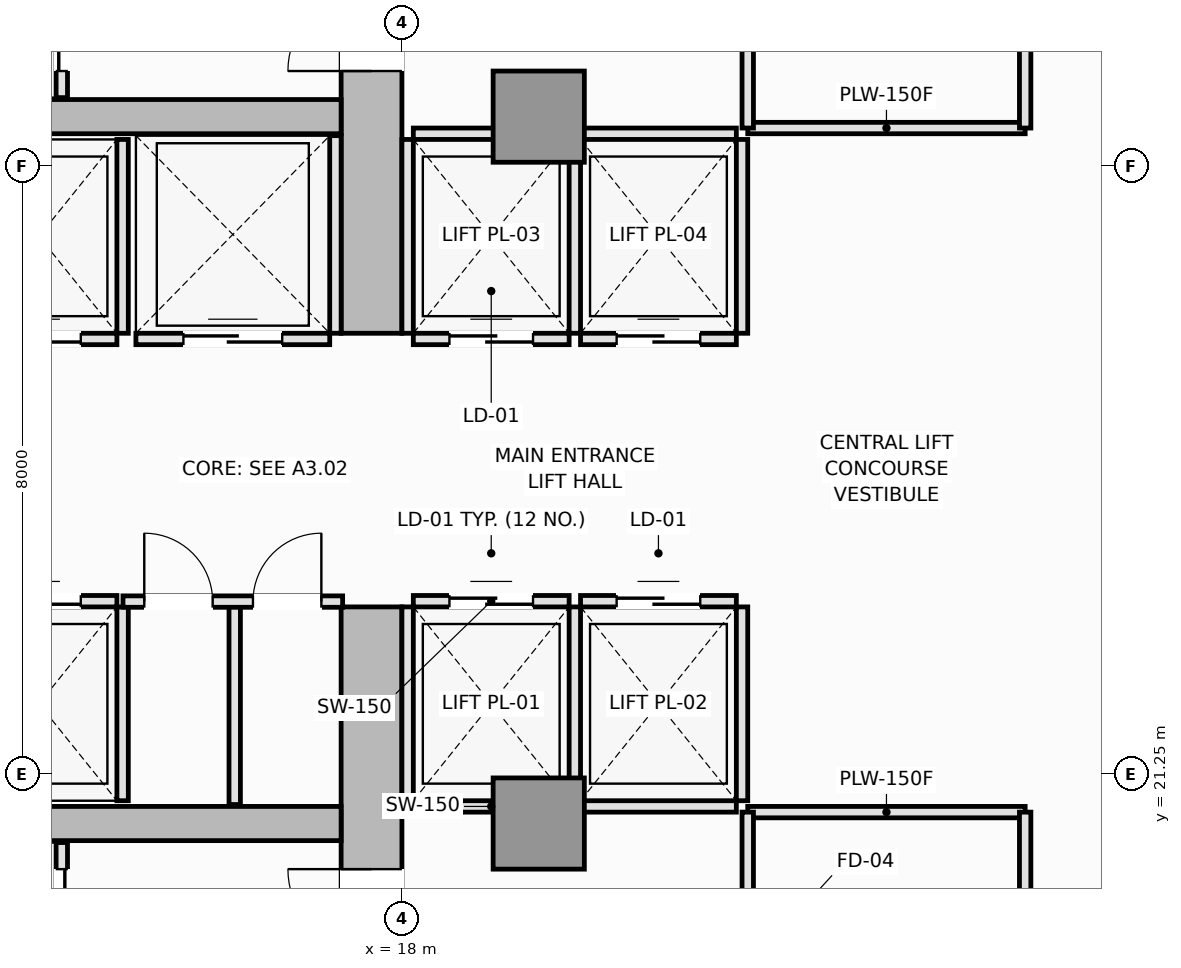
"""IFC4 building model, lengths in metres.
Left out: names, types, materials, properties, quantities, classifications, styles, units other than length and angle.
Written with IfcOpenShell. Run it as: python <this file> out.ifc"""

import sys

from ifc_helpers import new_model, si_unit, direction, frame, frame_2d, origin, origin_2d, place, context, subcontext, project, spatial, rectangle, extrude, element, fill, save


model = new_model("IFC4")
c1 = context("Model", 3, precision=1e-05, world=origin(), true_north=direction((0.0, 1.0)))
c2 = subcontext(c1, "Body", "Model", "MODEL_VIEW")
j1 = project(units=[si_unit("LENGTHUNIT", "METRE"), si_unit("PLANEANGLEUNIT", "RADIAN")], contexts=[c1])
p1 = place(None, origin())
s1 = spatial("IfcSite", under=j1, at=p1, CompositionType="ELEMENT")
p2 = place(p1, origin())
s2 = spatial("IfcBuilding", under=s1, at=p2, CompositionType="ELEMENT")
p3 = place(p2, origin())
s3 = spatial("IfcBuildingStorey", under=s2, at=p3, CompositionType="ELEMENT", Elevation=0.0)
p4 = place(p3, frame((17.6, 14.8, 0.0), z_axis=(0.0, 0.0, 1.0), x_axis=(0.0, 1.0, 0.0)))
e1 = element("IfcWall", 1, at=p4, inside=s3, PredefinedType="SHEAR", context=c2, shape_type="SweptSolid", body=[
    extrude(rectangle(XDim=8.65, YDim=0.8, at=frame_2d((4.325, 0.0))), origin(), (0.0, 0.0, 1.0), 6.0),
])
p5 = place(p4, frame((4.1, 0.0, 0.0)))
e2 = element("IfcOpeningElement", 2, at=p5, cuts=e1, PredefinedType="OPENING", context=c2, shape_type="SweptSolid", body=[
    extrude(rectangle(XDim=1.1, YDim=2.15, at=frame_2d((0.55, 1.075))), frame((0.0, 0.41, 0.0), z_axis=(0.0, -1.0, 0.0), x_axis=(1.0, 0.0, 0.0)), (0.0, 0.0, 1.0), 0.82),
])
p6 = place(p3, frame((17.6, 27.05, 0.0), z_axis=(0.0, 0.0, 1.0), x_axis=(0.0, 1.0, 0.0)))
e3 = element("IfcWall", 3, at=p6, inside=s3, PredefinedType="SHEAR", context=c2, shape_type="SweptSolid", body=[
    extrude(rectangle(XDim=8.65, YDim=0.8, at=frame_2d((4.325, 0.0))), origin(), (0.0, 0.0, 1.0), 6.0),
])
p7 = place(p6, frame((3.45, 0.0, 0.0)))
e4 = element("IfcOpeningElement", 4, at=p7, cuts=e3, PredefinedType="OPENING", context=c2, shape_type="SweptSolid", body=[
    extrude(rectangle(XDim=1.1, YDim=2.15, at=frame_2d((0.55, 1.075))), frame((0.0, 0.41, 0.0), z_axis=(0.0, -1.0, 0.0), x_axis=(1.0, 0.0, 0.0)), (0.0, 0.0, 1.0), 0.82),
])
for number, where, z_axis, x_axis in (
    (5, (5.3, 20.6, 0.0), (0.0, 0.0, 1.0), (1.0, 0.0, 0.0)),
    (6, (5.3, 29.9, 0.0), (0.0, 0.0, 1.0), (1.0, 0.0, 0.0)),
):
    element("IfcWall", number, at=place(p3, frame(where, z_axis=z_axis, x_axis=x_axis)), inside=s3, PredefinedType="SHEAR", context=c2, shape_type="SweptSolid", body=[
        extrude(rectangle(XDim=11.9, YDim=0.45, at=frame_2d((5.95, 0.0))), origin(), (0.0, 0.0, 1.0), 6.0),
    ])
for number, where, z_axis, x_axis in (
    (7, (19.8, 20.6, 0.0), (0.0, 0.0, 1.0), (1.0, 0.0, 0.0)),
    (8, (19.8, 29.9, 0.0), (0.0, 0.0, 1.0), (1.0, 0.0, 0.0)),
):
    element("IfcColumn", number, at=place(p3, frame(where, z_axis=z_axis, x_axis=x_axis)), inside=s3, PredefinedType="COLUMN", context=c2, shape_type="SweptSolid", body=[
        extrude(rectangle(XDim=1.2, YDim=1.2, at=origin_2d()), origin(), (0.0, 0.0, 1.0), 6.0),
    ])
p8 = place(p3, frame((18.15, 20.825, 0.0), z_axis=(0.0, 0.0, 1.0), x_axis=(1.0, 0.0, 0.0)))
e9 = element("IfcWall", 9, at=p8, inside=s3, PredefinedType="PARTITIONING", context=c2, shape_type="SweptSolid", body=[
    extrude(rectangle(XDim=2.05, YDim=0.15, at=frame_2d((1.025, 0.0))), origin(), (0.0, 0.0, 1.0), 5.8),
])
p9 = place(p3, frame((18.15, 23.525, 0.0), z_axis=(0.0, 0.0, 1.0), x_axis=(1.0, 0.0, 0.0)))
e10 = element("IfcWall", 10, at=p9, inside=s3, PredefinedType="PARTITIONING", context=c2, shape_type="SweptSolid", body=[
    extrude(rectangle(XDim=2.05, YDim=0.15, at=frame_2d((1.025, 0.0))), origin(), (0.0, 0.0, 1.0), 5.8),
])
p10 = place(p9, frame((0.475, 0.0, 0.0)))
e11 = element("IfcOpeningElement", 11, at=p10, cuts=e10, PredefinedType="OPENING", context=c2, shape_type="SweptSolid", body=[
    extrude(rectangle(XDim=1.1, YDim=2.2, at=frame_2d((0.55, 1.1))), frame((0.0, 0.085, 0.0), z_axis=(0.0, -1.0, 0.0), x_axis=(1.0, 0.0, 0.0)), (0.0, 0.0, 1.0), 0.17),
])
for number, where, z_axis, x_axis in (
    (12, (18.075, 20.9, 0.0), (0.0, 0.0, 1.0), (0.0, 1.0, 0.0)),
    (13, (20.275, 20.9, 0.0), (0.0, 0.0, 1.0), (0.0, 1.0, 0.0)),
):
    element("IfcWall", number, at=place(p3, frame(where, z_axis=z_axis, x_axis=x_axis)), inside=s3, PredefinedType="PARTITIONING", context=c2, shape_type="SweptSolid", body=[
        extrude(rectangle(XDim=2.55, YDim=0.15, at=frame_2d((1.275, 0.0))), origin(), (0.0, 0.0, 1.0), 5.8),
    ])
p11 = place(p3, frame((20.35, 20.825, 0.0), z_axis=(0.0, 0.0, 1.0), x_axis=(1.0, 0.0, 0.0)))
e14 = element("IfcWall", 14, at=p11, inside=s3, PredefinedType="PARTITIONING", context=c2, shape_type="SweptSolid", body=[
    extrude(rectangle(XDim=2.05, YDim=0.15, at=frame_2d((1.025, 0.0))), origin(), (0.0, 0.0, 1.0), 5.8),
])
p12 = place(p3, frame((20.35, 23.525, 0.0), z_axis=(0.0, 0.0, 1.0), x_axis=(1.0, 0.0, 0.0)))
e15 = element("IfcWall", 15, at=p12, inside=s3, PredefinedType="PARTITIONING", context=c2, shape_type="SweptSolid", body=[
    extrude(rectangle(XDim=2.05, YDim=0.15, at=frame_2d((1.025, 0.0))), origin(), (0.0, 0.0, 1.0), 5.8),
])
p13 = place(p12, frame((0.475, 0.0, 0.0)))
e16 = element("IfcOpeningElement", 16, at=p13, cuts=e15, PredefinedType="OPENING", context=c2, shape_type="SweptSolid", body=[
    extrude(rectangle(XDim=1.1, YDim=2.2, at=frame_2d((0.55, 1.1))), frame((0.0, 0.085, 0.0), z_axis=(0.0, -1.0, 0.0), x_axis=(1.0, 0.0, 0.0)), (0.0, 0.0, 1.0), 0.17),
])
p14 = place(p3, frame((22.475, 20.9, 0.0), z_axis=(0.0, 0.0, 1.0), x_axis=(0.0, 1.0, 0.0)))
e17 = element("IfcWall", 17, at=p14, inside=s3, PredefinedType="PARTITIONING", context=c2, shape_type="SweptSolid", body=[
    extrude(rectangle(XDim=2.55, YDim=0.15, at=frame_2d((1.275, 0.0))), origin(), (0.0, 0.0, 1.0), 5.8),
])
p15 = place(p3, frame((18.15, 26.975, 0.0), z_axis=(0.0, 0.0, 1.0), x_axis=(1.0, 0.0, 0.0)))
e18 = element("IfcWall", 18, at=p15, inside=s3, PredefinedType="PARTITIONING", context=c2, shape_type="SweptSolid", body=[
    extrude(rectangle(XDim=2.05, YDim=0.15, at=frame_2d((1.025, 0.0))), origin(), (0.0, 0.0, 1.0), 5.8),
])
p16 = place(p15, frame((0.475, 0.0, 0.0)))
e19 = element("IfcOpeningElement", 19, at=p16, cuts=e18, PredefinedType="OPENING", context=c2, shape_type="SweptSolid", body=[
    extrude(rectangle(XDim=1.1, YDim=2.2, at=frame_2d((0.55, 1.1))), frame((0.0, 0.085, 0.0), z_axis=(0.0, -1.0, 0.0), x_axis=(1.0, 0.0, 0.0)), (0.0, 0.0, 1.0), 0.17),
])
p17 = place(p3, frame((18.15, 29.675, 0.0), z_axis=(0.0, 0.0, 1.0), x_axis=(1.0, 0.0, 0.0)))
e20 = element("IfcWall", 20, at=p17, inside=s3, PredefinedType="PARTITIONING", context=c2, shape_type="SweptSolid", body=[
    extrude(rectangle(XDim=2.05, YDim=0.15, at=frame_2d((1.025, 0.0))), origin(), (0.0, 0.0, 1.0), 5.8),
])
for number, where, z_axis, x_axis in (
    (21, (18.075, 27.05, 0.0), (0.0, 0.0, 1.0), (0.0, 1.0, 0.0)),
    (22, (20.275, 27.05, 0.0), (0.0, 0.0, 1.0), (0.0, 1.0, 0.0)),
):
    element("IfcWall", number, at=place(p3, frame(where, z_axis=z_axis, x_axis=x_axis)), inside=s3, PredefinedType="PARTITIONING", context=c2, shape_type="SweptSolid", body=[
        extrude(rectangle(XDim=2.55, YDim=0.15, at=frame_2d((1.275, 0.0))), origin(), (0.0, 0.0, 1.0), 5.8),
    ])
p18 = place(p3, frame((20.35, 26.975, 0.0), z_axis=(0.0, 0.0, 1.0), x_axis=(1.0, 0.0, 0.0)))
e23 = element("IfcWall", 23, at=p18, inside=s3, PredefinedType="PARTITIONING", context=c2, shape_type="SweptSolid", body=[
    extrude(rectangle(XDim=2.05, YDim=0.15, at=frame_2d((1.025, 0.0))), origin(), (0.0, 0.0, 1.0), 5.8),
])
p19 = place(p18, frame((0.475, 0.0, 0.0)))
e24 = element("IfcOpeningElement", 24, at=p19, cuts=e23, PredefinedType="OPENING", context=c2, shape_type="SweptSolid", body=[
    extrude(rectangle(XDim=1.1, YDim=2.2, at=frame_2d((0.55, 1.1))), frame((0.0, 0.085, 0.0), z_axis=(0.0, -1.0, 0.0), x_axis=(1.0, 0.0, 0.0)), (0.0, 0.0, 1.0), 0.17),
])
p20 = place(p3, frame((20.35, 29.675, 0.0), z_axis=(0.0, 0.0, 1.0), x_axis=(1.0, 0.0, 0.0)))
e25 = element("IfcWall", 25, at=p20, inside=s3, PredefinedType="PARTITIONING", context=c2, shape_type="SweptSolid", body=[
    extrude(rectangle(XDim=2.05, YDim=0.15, at=frame_2d((1.025, 0.0))), origin(), (0.0, 0.0, 1.0), 5.8),
])
p21 = place(p3, frame((22.475, 27.05, 0.0), z_axis=(0.0, 0.0, 1.0), x_axis=(0.0, 1.0, 0.0)))
e26 = element("IfcWall", 26, at=p21, inside=s3, PredefinedType="PARTITIONING", context=c2, shape_type="SweptSolid", body=[
    extrude(rectangle(XDim=2.55, YDim=0.15, at=frame_2d((1.275, 0.0))), origin(), (0.0, 0.0, 1.0), 5.8),
])
p22 = place(p3, frame((12.2, 23.525, 0.0), z_axis=(0.0, 0.0, 1.0), x_axis=(1.0, 0.0, 0.0)))
e27 = element("IfcWall", 27, at=p22, inside=s3, PredefinedType="PARTITIONING", context=c2, shape_type="SweptSolid", body=[
    extrude(rectangle(XDim=2.05, YDim=0.15, at=frame_2d((1.025, 0.0))), origin(), (0.0, 0.0, 1.0), 5.8),
])
p23 = place(p22, frame((0.475, 0.0, 0.0)))
e28 = element("IfcOpeningElement", 28, at=p23, cuts=e27, PredefinedType="OPENING", context=c2, shape_type="SweptSolid", body=[
    extrude(rectangle(XDim=1.1, YDim=2.2, at=frame_2d((0.55, 1.1))), frame((0.0, 0.085, 0.0), z_axis=(0.0, -1.0, 0.0), x_axis=(1.0, 0.0, 0.0)), (0.0, 0.0, 1.0), 0.17),
])
p24 = place(p3, frame((14.325, 20.9, 0.0), z_axis=(0.0, 0.0, 1.0), x_axis=(0.0, 1.0, 0.0)))
e29 = element("IfcWall", 29, at=p24, inside=s3, PredefinedType="PARTITIONING", context=c2, shape_type="SweptSolid", body=[
    extrude(rectangle(XDim=2.55, YDim=0.15, at=frame_2d((1.275, 0.0))), origin(), (0.0, 0.0, 1.0), 5.8),
])
p25 = place(p3, frame((12.2, 26.975, 0.0), z_axis=(0.0, 0.0, 1.0), x_axis=(1.0, 0.0, 0.0)))
e30 = element("IfcWall", 30, at=p25, inside=s3, PredefinedType="PARTITIONING", context=c2, shape_type="SweptSolid", body=[
    extrude(rectangle(XDim=2.05, YDim=0.15, at=frame_2d((1.025, 0.0))), origin(), (0.0, 0.0, 1.0), 5.8),
])
p26 = place(p25, frame((0.475, 0.0, 0.0)))
e31 = element("IfcOpeningElement", 31, at=p26, cuts=e30, PredefinedType="OPENING", context=c2, shape_type="SweptSolid", body=[
    extrude(rectangle(XDim=1.1, YDim=2.2, at=frame_2d((0.55, 1.1))), frame((0.0, 0.085, 0.0), z_axis=(0.0, -1.0, 0.0), x_axis=(1.0, 0.0, 0.0)), (0.0, 0.0, 1.0), 0.17),
])
p27 = place(p3, frame((14.325, 27.05, 0.0), z_axis=(0.0, 0.0, 1.0), x_axis=(0.0, 1.0, 0.0)))
e32 = element("IfcWall", 32, at=p27, inside=s3, PredefinedType="PARTITIONING", context=c2, shape_type="SweptSolid", body=[
    extrude(rectangle(XDim=2.55, YDim=0.15, at=frame_2d((1.275, 0.0))), origin(), (0.0, 0.0, 1.0), 5.8),
])
p28 = place(p3, frame((14.5, 26.975, 0.0), z_axis=(0.0, 0.0, 1.0), x_axis=(1.0, 0.0, 0.0)))
e33 = element("IfcWall", 33, at=p28, inside=s3, PredefinedType="PARTITIONING", context=c2, shape_type="SweptSolid", body=[
    extrude(rectangle(XDim=2.55, YDim=0.15, at=frame_2d((1.275, 0.0))), origin(), (0.0, 0.0, 1.0), 5.8),
])
p29 = place(p28, frame((0.625, 0.0, 0.0)))
e34 = element("IfcOpeningElement", 34, at=p29, cuts=e33, PredefinedType="OPENING", context=c2, shape_type="SweptSolid", body=[
    extrude(rectangle(XDim=1.3, YDim=2.2, at=frame_2d((0.65, 1.1))), frame((0.0, 0.085, 0.0), z_axis=(0.0, -1.0, 0.0), x_axis=(1.0, 0.0, 0.0)), (0.0, 0.0, 1.0), 0.17),
])
p30 = place(p3, frame((17.125, 27.05, 0.0), z_axis=(0.0, 0.0, 1.0), x_axis=(0.0, 1.0, 0.0)))
e35 = element("IfcWall", 35, at=p30, inside=s3, PredefinedType="PARTITIONING", context=c2, shape_type="SweptSolid", body=[
    extrude(rectangle(XDim=2.6, YDim=0.15, at=frame_2d((1.3, 0.0))), origin(), (0.0, 0.0, 1.0), 5.8),
])
p31 = place(p3, frame((13.525, 18.55, 0.0), z_axis=(0.0, 0.0, 1.0), x_axis=(0.0, 1.0, 0.0)))
e36 = element("IfcWall", 36, at=p31, inside=s3, PredefinedType="PARTITIONING", context=c2, shape_type="SweptSolid", body=[
    extrude(rectangle(XDim=1.8, YDim=0.15, at=frame_2d((0.9, 0.0))), origin(), (0.0, 0.0, 1.0), 5.8),
])
p32 = place(p31, frame((0.35, 0.0, 0.0)))
e37 = element("IfcOpeningElement", 37, at=p32, cuts=e36, PredefinedType="OPENING", context=c2, shape_type="SweptSolid", body=[
    extrude(rectangle(XDim=1.1, YDim=2.2, at=frame_2d((0.55, 1.1))), frame((0.0, 0.085, 0.0), z_axis=(0.0, -1.0, 0.0), x_axis=(1.0, 0.0, 0.0)), (0.0, 0.0, 1.0), 0.17),
])
p33 = place(p3, frame((13.525, 30.15, 0.0), z_axis=(0.0, 0.0, 1.0), x_axis=(0.0, 1.0, 0.0)))
e38 = element("IfcWall", 38, at=p33, inside=s3, PredefinedType="PARTITIONING", context=c2, shape_type="SweptSolid", body=[
    extrude(rectangle(XDim=1.8, YDim=0.15, at=frame_2d((0.9, 0.0))), origin(), (0.0, 0.0, 1.0), 5.8),
])
p34 = place(p33, frame((0.35, 0.0, 0.0)))
e39 = element("IfcOpeningElement", 39, at=p34, cuts=e38, PredefinedType="OPENING", context=c2, shape_type="SweptSolid", body=[
    extrude(rectangle(XDim=1.1, YDim=2.2, at=frame_2d((0.55, 1.1))), frame((0.0, 0.085, 0.0), z_axis=(0.0, -1.0, 0.0), x_axis=(1.0, 0.0, 0.0)), (0.0, 0.0, 1.0), 0.17),
])
p35 = place(p3, frame((15.8, 20.85, 0.0), z_axis=(0.0, 0.0, 1.0), x_axis=(0.0, 1.0, 0.0)))
e40 = element("IfcWall", 40, at=p35, inside=s3, PredefinedType="PARTITIONING", context=c2, shape_type="SweptSolid", body=[
    extrude(rectangle(XDim=2.67, YDim=0.15, at=frame_2d((1.335, 0.0))), origin(), (0.0, 0.0, 1.0), 5.8),
])
p36 = place(p3, frame((14.33, 23.52, 0.0), z_axis=(0.0, 0.0, 1.0), x_axis=(1.0, 0.0, 0.0)))
e41 = element("IfcWall", 41, at=p36, inside=s3, PredefinedType="PARTITIONING", context=c2, shape_type="SweptSolid", body=[
    extrude(rectangle(XDim=2.89, YDim=0.15, at=frame_2d((1.445, 0.0))), origin(), (0.0, 0.0, 1.0), 5.8),
])
p37 = place(p36, frame((0.28, 0.0, 0.0)))
e42 = element("IfcOpeningElement", 42, at=p37, cuts=e41, PredefinedType="OPENING", context=c2, shape_type="SweptSolid", body=[
    extrude(rectangle(XDim=0.9, YDim=2.1, at=frame_2d((0.45, 1.05))), frame((0.0, 0.085, 0.0), z_axis=(0.0, -1.0, 0.0), x_axis=(1.0, 0.0, 0.0)), (0.0, 0.0, 1.0), 0.17),
])
p38 = place(p36, frame((1.71, 0.0, 0.0)))
e43 = element("IfcOpeningElement", 43, at=p38, cuts=e41, PredefinedType="OPENING", context=c2, shape_type="SweptSolid", body=[
    extrude(rectangle(XDim=0.9, YDim=2.1, at=frame_2d((0.45, 1.05))), frame((0.0, 0.085, 0.0), z_axis=(0.0, -1.0, 0.0), x_axis=(1.0, 0.0, 0.0)), (0.0, 0.0, 1.0), 0.17),
])
for number, where, z_axis, x_axis in (
    (44, (22.55, 20.75, 0.0), (0.0, 0.0, 1.0), (1.0, 0.0, 0.0)),
    (45, (22.55, 29.75, 0.0), (0.0, 0.0, 1.0), (1.0, 0.0, 0.0)),
):
    element("IfcWall", number, at=place(p3, frame(where, z_axis=z_axis, x_axis=x_axis)), inside=s3, PredefinedType="PLUMBINGWALL", context=c2, shape_type="SweptSolid", body=[
        extrude(rectangle(XDim=3.65, YDim=0.15, at=frame_2d((1.825, 0.0))), origin(), (0.0, 0.0, 1.0), 5.8),
    ])
p39 = place(p3, frame((26.2, 17.75, 0.0), z_axis=(0.0, 0.0, 1.0), x_axis=(0.0, 1.0, 0.0)))
e46 = element("IfcWall", 46, at=p39, inside=s3, PredefinedType="PLUMBINGWALL", context=c2, shape_type="SweptSolid", body=[
    extrude(rectangle(XDim=3.0, YDim=0.15, at=frame_2d((1.5, 0.0))), origin(), (0.0, 0.0, 1.0), 5.8),
])
p40 = place(p3, frame((26.2, 29.75, 0.0), z_axis=(0.0, 0.0, 1.0), x_axis=(0.0, 1.0, 0.0)))
e47 = element("IfcWall", 47, at=p40, inside=s3, PredefinedType="PLUMBINGWALL", context=c2, shape_type="SweptSolid", body=[
    extrude(rectangle(XDim=3.35, YDim=0.15, at=frame_2d((1.675, 0.0))), origin(), (0.0, 0.0, 1.0), 5.8),
])
p41 = place(p3, frame((22.55, 17.75, 0.0), z_axis=(0.0, 0.0, 1.0), x_axis=(0.0, 1.0, 0.0)))
e48 = element("IfcWall", 48, at=p41, inside=s3, PredefinedType="PLUMBINGWALL", context=c2, shape_type="SweptSolid", body=[
    extrude(rectangle(XDim=3.0, YDim=0.15, at=frame_2d((1.5, 0.0))), origin(), (0.0, 0.0, 1.0), 5.8),
])
p42 = place(p41, frame((1.05, 0.0, 0.0)))
e49 = element("IfcOpeningElement", 49, at=p42, cuts=e48, PredefinedType="OPENING", context=c2, shape_type="SweptSolid", body=[
    extrude(rectangle(XDim=0.9, YDim=2.1, at=frame_2d((0.45, 1.05))), frame((0.0, 0.085, 0.0), z_axis=(0.0, -1.0, 0.0), x_axis=(1.0, 0.0, 0.0)), (0.0, 0.0, 1.0), 0.17),
])
p43 = place(p3, frame((22.55, 29.75, 0.0), z_axis=(0.0, 0.0, 1.0), x_axis=(0.0, 1.0, 0.0)))
e50 = element("IfcWall", 50, at=p43, inside=s3, PredefinedType="PLUMBINGWALL", context=c2, shape_type="SweptSolid", body=[
    extrude(rectangle(XDim=3.35, YDim=0.15, at=frame_2d((1.675, 0.0))), origin(), (0.0, 0.0, 1.0), 5.8),
])
p44 = place(p43, frame((1.225, 0.0, 0.0)))
e51 = element("IfcOpeningElement", 51, at=p44, cuts=e50, PredefinedType="OPENING", context=c2, shape_type="SweptSolid", body=[
    extrude(rectangle(XDim=0.9, YDim=2.1, at=frame_2d((0.45, 1.05))), frame((0.0, 0.085, 0.0), z_axis=(0.0, -1.0, 0.0), x_axis=(1.0, 0.0, 0.0)), (0.0, 0.0, 1.0), 0.17),
])
p45 = place(p10, origin())
e52 = element("IfcDoor", 52, at=p45, inside=s3, OperationType="DOUBLE_DOOR_SLIDING", PredefinedType="DOOR", context=c2, shape_type="SweptSolid", body=[
    extrude(rectangle(XDim=1.1, YDim=2.2, at=frame_2d((0.55, 1.1))), frame((0.0, 0.025, 0.0), z_axis=(0.0, -1.0, 0.0), x_axis=(1.0, 0.0, 0.0)), (0.0, 0.0, 1.0), 0.05),
])
fill(e11, e52)
p46 = place(p13, origin())
e53 = element("IfcDoor", 53, at=p46, inside=s3, OperationType="DOUBLE_DOOR_SLIDING", PredefinedType="DOOR", context=c2, shape_type="SweptSolid", body=[
    extrude(rectangle(XDim=1.1, YDim=2.2, at=frame_2d((0.55, 1.1))), frame((0.0, 0.025, 0.0), z_axis=(0.0, -1.0, 0.0), x_axis=(1.0, 0.0, 0.0)), (0.0, 0.0, 1.0), 0.05),
])
fill(e16, e53)
p47 = place(p16, origin())
e54 = element("IfcDoor", 54, at=p47, inside=s3, OperationType="DOUBLE_DOOR_SLIDING", PredefinedType="DOOR", context=c2, shape_type="SweptSolid", body=[
    extrude(rectangle(XDim=1.1, YDim=2.2, at=frame_2d((0.55, 1.1))), frame((0.0, 0.025, 0.0), z_axis=(0.0, -1.0, 0.0), x_axis=(1.0, 0.0, 0.0)), (0.0, 0.0, 1.0), 0.05),
])
fill(e19, e54)
p48 = place(p19, origin())
e55 = element("IfcDoor", 55, at=p48, inside=s3, OperationType="DOUBLE_DOOR_SLIDING", PredefinedType="DOOR", context=c2, shape_type="SweptSolid", body=[
    extrude(rectangle(XDim=1.1, YDim=2.2, at=frame_2d((0.55, 1.1))), frame((0.0, 0.025, 0.0), z_axis=(0.0, -1.0, 0.0), x_axis=(1.0, 0.0, 0.0)), (0.0, 0.0, 1.0), 0.05),
])
fill(e24, e55)
p49 = place(p23, origin())
e56 = element("IfcDoor", 56, at=p49, inside=s3, OperationType="DOUBLE_DOOR_SLIDING", PredefinedType="DOOR", context=c2, shape_type="SweptSolid", body=[
    extrude(rectangle(XDim=1.1, YDim=2.2, at=frame_2d((0.55, 1.1))), frame((0.0, 0.025, 0.0), z_axis=(0.0, -1.0, 0.0), x_axis=(1.0, 0.0, 0.0)), (0.0, 0.0, 1.0), 0.05),
])
fill(e28, e56)
p50 = place(p26, origin())
e57 = element("IfcDoor", 57, at=p50, inside=s3, OperationType="DOUBLE_DOOR_SLIDING", PredefinedType="DOOR", context=c2, shape_type="SweptSolid", body=[
    extrude(rectangle(XDim=1.1, YDim=2.2, at=frame_2d((0.55, 1.1))), frame((0.0, 0.025, 0.0), z_axis=(0.0, -1.0, 0.0), x_axis=(1.0, 0.0, 0.0)), (0.0, 0.0, 1.0), 0.05),
])
fill(e31, e57)
p51 = place(p29, origin())
e58 = element("IfcDoor", 58, at=p51, inside=s3, OperationType="DOUBLE_DOOR_SLIDING", PredefinedType="DOOR", context=c2, shape_type="SweptSolid", body=[
    extrude(rectangle(XDim=1.3, YDim=2.2, at=frame_2d((0.65, 1.1))), frame((0.0, 0.025, 0.0), z_axis=(0.0, -1.0, 0.0), x_axis=(1.0, 0.0, 0.0)), (0.0, 0.0, 1.0), 0.05),
])
fill(e34, e58)
p52 = place(p32, origin())
e59 = element("IfcDoor", 59, at=p52, inside=s3, OperationType="DOUBLE_DOOR_SLIDING", PredefinedType="DOOR", context=c2, shape_type="SweptSolid", body=[
    extrude(rectangle(XDim=1.1, YDim=2.2, at=frame_2d((0.55, 1.1))), frame((0.0, 0.025, 0.0), z_axis=(0.0, -1.0, 0.0), x_axis=(1.0, 0.0, 0.0)), (0.0, 0.0, 1.0), 0.05),
])
fill(e37, e59)
p53 = place(p34, origin())
e60 = element("IfcDoor", 60, at=p53, inside=s3, OperationType="DOUBLE_DOOR_SLIDING", PredefinedType="DOOR", context=c2, shape_type="SweptSolid", body=[
    extrude(rectangle(XDim=1.1, YDim=2.2, at=frame_2d((0.55, 1.1))), frame((0.0, 0.025, 0.0), z_axis=(0.0, -1.0, 0.0), x_axis=(1.0, 0.0, 0.0)), (0.0, 0.0, 1.0), 0.05),
])
fill(e39, e60)
p54 = place(p5, origin())
e61 = element("IfcDoor", 61, at=p54, inside=s3, OperationType="SINGLE_SWING_RIGHT", PredefinedType="DOOR", context=c2, shape_type="SweptSolid", body=[
    extrude(rectangle(XDim=1.1, YDim=2.15, at=frame_2d((0.55, 1.075))), frame((0.0, 0.025, 0.0), z_axis=(0.0, -1.0, 0.0), x_axis=(1.0, 0.0, 0.0)), (0.0, 0.0, 1.0), 0.05),
])
fill(e2, e61)
p55 = place(p7, origin())
e62 = element("IfcDoor", 62, at=p55, inside=s3, OperationType="SINGLE_SWING_LEFT", PredefinedType="DOOR", context=c2, shape_type="SweptSolid", body=[
    extrude(rectangle(XDim=1.1, YDim=2.15, at=frame_2d((0.55, 1.075))), frame((0.0, 0.025, 0.0), z_axis=(0.0, -1.0, 0.0), x_axis=(1.0, 0.0, 0.0)), (0.0, 0.0, 1.0), 0.05),
])
fill(e4, e62)
p56 = place(p37, origin())
e63 = element("IfcDoor", 63, at=p56, inside=s3, OperationType="SINGLE_SWING_LEFT", PredefinedType="DOOR", context=c2, shape_type="SweptSolid", body=[
    extrude(rectangle(XDim=0.9, YDim=2.1, at=frame_2d((0.45, 1.05))), frame((0.0, 0.025, 0.0), z_axis=(0.0, -1.0, 0.0), x_axis=(1.0, 0.0, 0.0)), (0.0, 0.0, 1.0), 0.05),
])
fill(e42, e63)
p57 = place(p38, origin())
e64 = element("IfcDoor", 64, at=p57, inside=s3, OperationType="SINGLE_SWING_RIGHT", PredefinedType="DOOR", context=c2, shape_type="SweptSolid", body=[
    extrude(rectangle(XDim=0.9, YDim=2.1, at=frame_2d((0.45, 1.05))), frame((0.0, 0.025, 0.0), z_axis=(0.0, -1.0, 0.0), x_axis=(1.0, 0.0, 0.0)), (0.0, 0.0, 1.0), 0.05),
])
fill(e43, e64)
save(model, sys.argv[1])
